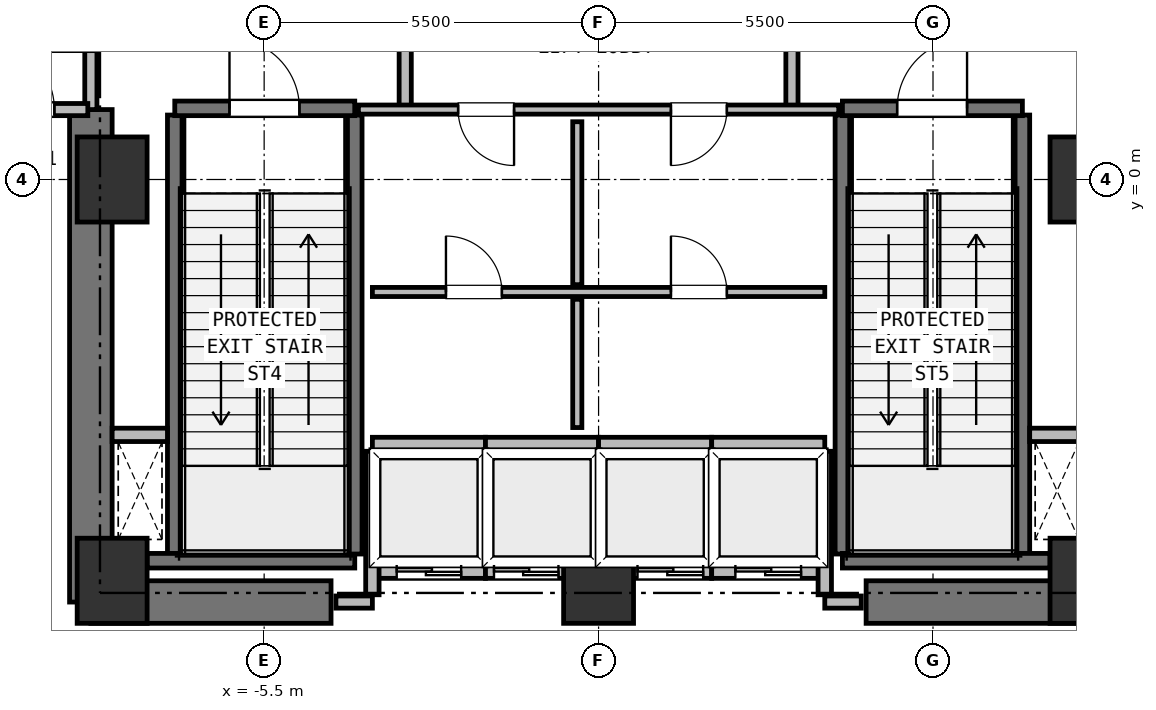
"""IFC4 building model, lengths in metres.
Left out: names, types, materials, properties, quantities, classifications, styles, units other than length and angle.
Written with IfcOpenShell. Run it as: python <this file> out.ifc"""

import sys

from ifc_helpers import new_model, si_unit, direction, frame, frame_2d, origin, origin_2d, place, context, subcontext, project, spatial, rectangle, extrude, element, fill, save


model = new_model("IFC4")
c1 = context("Model", 3, precision=1e-05, world=origin(), true_north=direction((0.0, 1.0)))
c2 = subcontext(c1, "Body", "Model", "MODEL_VIEW")
j1 = project(units=[si_unit("LENGTHUNIT", "METRE"), si_unit("PLANEANGLEUNIT", "RADIAN")], contexts=[c1])
p1 = place(None, origin())
s1 = spatial("IfcSite", under=j1, at=p1, CompositionType="ELEMENT")
p2 = place(p1, origin())
s2 = spatial("IfcBuilding", under=s1, at=p2, CompositionType="ELEMENT")
p3 = place(p2, origin())
s3 = spatial("IfcBuildingStorey", under=s2, at=p3, CompositionType="ELEMENT", Elevation=0.0)
for number, where, z_axis, x_axis in (
    (1, (-8.0, -6.6, 0.0), (0.0, 0.0, 1.0), (1.0, 0.0, 0.0)),
    (2, (0.0, -6.6, 0.0), (0.0, 0.0, 1.0), (1.0, 0.0, 0.0)),
    (3, (8.0, -6.6, 0.0), (0.0, 0.0, 1.0), (1.0, 0.0, 0.0)),
    (4, (8.0, 0.0, 0.0), (0.0, 0.0, 1.0), (1.0, 0.0, 0.0)),
    (5, (-8.0, 0.0, 0.0), (0.0, 0.0, 1.0), (1.0, 0.0, 0.0)),
):
    element("IfcColumn", number, at=place(p3, frame(where, z_axis=z_axis, x_axis=x_axis)), inside=s3, PredefinedType="COLUMN", context=c2, shape_type="SweptSolid", body=[
        extrude(rectangle(XDim=1.15, YDim=1.4, at=origin_2d()), origin(), (0.0, 0.0, 1.0), 6.0),
    ])
for number, where, z_axis, x_axis in (
    (6, (-8.35, -6.95, 0.0), (0.0, 0.0, 1.0), (1.0, 0.0, 0.0)),
    (7, (4.4, -6.95, 0.0), (0.0, 0.0, 1.0), (1.0, 0.0, 0.0)),
):
    element("IfcWall", number, at=place(p3, frame(where, z_axis=z_axis, x_axis=x_axis)), inside=s3, PredefinedType="SHEAR", context=c2, shape_type="SweptSolid", body=[
        extrude(rectangle(XDim=3.95, YDim=0.7, at=frame_2d((1.975, 0.0))), origin(), (0.0, 0.0, 1.0), 5.72),
    ])
p4 = place(p3, frame((-8.35, -6.95, 0.0), z_axis=(0.0, 0.0, 1.0), x_axis=(0.0, 1.0, 0.0)))
e8 = element("IfcWall", 8, at=p4, inside=s3, PredefinedType="SHEAR", context=c2, shape_type="SweptSolid", body=[
    extrude(rectangle(XDim=8.1, YDim=0.7, at=frame_2d((4.05, 0.0))), origin(), (0.0, 0.0, 1.0), 5.72),
])
p5 = place(p3, frame((-6.97, -6.16, 0.0), z_axis=(0.0, 0.0, 1.0), x_axis=(0.0, 1.0, 0.0)))
e9 = element("IfcWall", 9, at=p5, inside=s3, PredefinedType="SHEAR", context=c2, shape_type="SweptSolid", body=[
    extrude(rectangle(XDim=7.22, YDim=0.24, at=frame_2d((3.61, 0.0))), origin(), (0.0, 0.0, 1.0), 5.72),
])
p6 = place(p3, frame((-7.425, -6.27, 0.0), z_axis=(0.0, 0.0, 1.0), x_axis=(1.0, 0.0, 0.0)))
e10 = element("IfcWall", 10, at=p6, inside=s3, PredefinedType="SHEAR", context=c2, shape_type="SweptSolid", body=[
    extrude(rectangle(XDim=3.415, YDim=0.24, at=frame_2d((1.708, 0.0))), origin(), (0.0, 0.0, 1.0), 5.72),
])
p7 = place(p3, frame((-4.01, -6.16, 0.0), z_axis=(0.0, 0.0, 1.0), x_axis=(0.0, 1.0, 0.0)))
e11 = element("IfcWall", 11, at=p7, inside=s3, PredefinedType="SHEAR", context=c2, shape_type="SweptSolid", body=[
    extrude(rectangle(XDim=7.22, YDim=0.24, at=frame_2d((3.61, 0.0))), origin(), (0.0, 0.0, 1.0), 5.72),
])
p8 = place(p3, frame((-6.97, 1.17, 0.0), z_axis=(0.0, 0.0, 1.0), x_axis=(1.0, 0.0, 0.0)))
e12 = element("IfcWall", 12, at=p8, inside=s3, PredefinedType="SHEAR", context=c2, shape_type="SweptSolid", body=[
    extrude(rectangle(XDim=2.96, YDim=0.24, at=frame_2d((1.48, 0.0))), origin(), (0.0, 0.0, 1.0), 5.72),
])
p9 = place(p8, frame((0.9, 0.0, 0.0)))
e13 = element("IfcOpeningElement", 13, at=p9, cuts=e12, PredefinedType="OPENING", context=c2, shape_type="SweptSolid", body=[
    extrude(rectangle(XDim=1.15, YDim=2.15, at=frame_2d((0.575, 1.075))), frame((0.0, 0.13, 0.0), z_axis=(0.0, -1.0, 0.0), x_axis=(1.0, 0.0, 0.0)), (0.0, 0.0, 1.0), 0.26),
])
for number, where, z_axis, x_axis in (
    (14, (4.01, -6.16, 0.0), (0.0, 0.0, 1.0), (0.0, 1.0, 0.0)),
    (15, (6.97, -6.16, 0.0), (0.0, 0.0, 1.0), (0.0, 1.0, 0.0)),
):
    element("IfcWall", number, at=place(p3, frame(where, z_axis=z_axis, x_axis=x_axis)), inside=s3, PredefinedType="SHEAR", context=c2, shape_type="SweptSolid", body=[
        extrude(rectangle(XDim=7.22, YDim=0.24, at=frame_2d((3.61, 0.0))), origin(), (0.0, 0.0, 1.0), 5.72),
    ])
p10 = place(p3, frame((4.01, -6.27, 0.0), z_axis=(0.0, 0.0, 1.0), x_axis=(1.0, 0.0, 0.0)))
e16 = element("IfcWall", 16, at=p10, inside=s3, PredefinedType="SHEAR", context=c2, shape_type="SweptSolid", body=[
    extrude(rectangle(XDim=3.415, YDim=0.24, at=frame_2d((1.708, 0.0))), origin(), (0.0, 0.0, 1.0), 5.72),
])
p11 = place(p3, frame((4.01, 1.17, 0.0), z_axis=(0.0, 0.0, 1.0), x_axis=(1.0, 0.0, 0.0)))
e17 = element("IfcWall", 17, at=p11, inside=s3, PredefinedType="SHEAR", context=c2, shape_type="SweptSolid", body=[
    extrude(rectangle(XDim=2.96, YDim=0.24, at=frame_2d((1.48, 0.0))), origin(), (0.0, 0.0, 1.0), 5.72),
])
p12 = place(p11, frame((0.9, 0.0, 0.0)))
e18 = element("IfcOpeningElement", 18, at=p12, cuts=e17, PredefinedType="OPENING", context=c2, shape_type="SweptSolid", body=[
    extrude(rectangle(XDim=1.15, YDim=2.15, at=frame_2d((0.575, 1.075))), frame((0.0, 0.13, 0.0), z_axis=(0.0, -1.0, 0.0), x_axis=(1.0, 0.0, 0.0)), (0.0, 0.0, 1.0), 0.26),
])
for number, where, z_axis, x_axis in (
    (19, (-8.0, -4.2, 0.0), (0.0, 0.0, 1.0), (1.0, 0.0, 0.0)),
    (20, (7.09, -4.2, 0.0), (0.0, 0.0, 1.0), (1.0, 0.0, 0.0)),
):
    element("IfcWall", number, at=place(p3, frame(where, z_axis=z_axis, x_axis=x_axis)), inside=s3, PredefinedType="PARTITIONING", context=c2, shape_type="SweptSolid", body=[
        extrude(rectangle(XDim=0.91, YDim=0.22, at=frame_2d((0.455, 0.0))), origin(), (0.0, 0.0, 1.0), 5.72),
    ])
p13 = place(p3, frame((-3.72, -6.45, 0.0), z_axis=(0.0, 0.0, 1.0), x_axis=(1.0, 0.0, 0.0)))
e21 = element("IfcWall", 21, at=p13, inside=s3, PredefinedType="PARTITIONING", context=c2, shape_type="SweptSolid", body=[
    extrude(rectangle(XDim=1.86, YDim=0.22, at=frame_2d((0.93, 0.0))), origin(), (0.0, 0.0, 1.0), 5.3),
])
p14 = place(p13, frame((0.4, 0.0, 0.0)))
e22 = element("IfcOpeningElement", 22, at=p14, cuts=e21, PredefinedType="OPENING", context=c2, shape_type="SweptSolid", body=[
    extrude(rectangle(XDim=1.06, YDim=2.15, at=frame_2d((0.53, 1.075))), frame((0.0, 0.12, 0.0), z_axis=(0.0, -1.0, 0.0), x_axis=(1.0, 0.0, 0.0)), (0.0, 0.0, 1.0), 0.24),
])
p15 = place(p3, frame((-3.72, -4.35, 0.0), z_axis=(0.0, 0.0, 1.0), x_axis=(1.0, 0.0, 0.0)))
e23 = element("IfcWall", 23, at=p15, inside=s3, PredefinedType="PARTITIONING", context=c2, shape_type="SweptSolid", body=[
    extrude(rectangle(XDim=1.86, YDim=0.22, at=frame_2d((0.93, 0.0))), origin(), (0.0, 0.0, 1.0), 5.72),
])
p16 = place(p3, frame((-3.72, -6.83, 0.0), z_axis=(0.0, 0.0, 1.0), x_axis=(0.0, 1.0, 0.0)))
e24 = element("IfcWall", 24, at=p16, inside=s3, PredefinedType="PARTITIONING", context=c2, shape_type="SweptSolid", body=[
    extrude(rectangle(XDim=2.36, YDim=0.22, at=frame_2d((1.18, 0.0))), origin(), (0.0, 0.0, 1.0), 5.72),
])
p17 = place(p3, frame((-1.86, -6.33, 0.0), z_axis=(0.0, 0.0, 1.0), x_axis=(0.0, 1.0, 0.0)))
e25 = element("IfcWall", 25, at=p17, inside=s3, PredefinedType="PARTITIONING", context=c2, shape_type="SweptSolid", body=[
    extrude(rectangle(XDim=1.86, YDim=0.22, at=frame_2d((0.93, 0.0))), origin(), (0.0, 0.0, 1.0), 5.72),
])
p18 = place(p3, frame((-1.86, -6.45, 0.0), z_axis=(0.0, 0.0, 1.0), x_axis=(1.0, 0.0, 0.0)))
e26 = element("IfcWall", 26, at=p18, inside=s3, PredefinedType="PARTITIONING", context=c2, shape_type="SweptSolid", body=[
    extrude(rectangle(XDim=1.86, YDim=0.22, at=frame_2d((0.93, 0.0))), origin(), (0.0, 0.0, 1.0), 5.3),
])
p19 = place(p18, frame((0.14, 0.0, 0.0)))
e27 = element("IfcOpeningElement", 27, at=p19, cuts=e26, PredefinedType="OPENING", context=c2, shape_type="SweptSolid", body=[
    extrude(rectangle(XDim=1.06, YDim=2.15, at=frame_2d((0.53, 1.075))), frame((0.0, 0.12, 0.0), z_axis=(0.0, -1.0, 0.0), x_axis=(1.0, 0.0, 0.0)), (0.0, 0.0, 1.0), 0.24),
])
for number, where, z_axis, x_axis in (
    (28, (-1.86, -4.35, 0.0), (0.0, 0.0, 1.0), (1.0, 0.0, 0.0)),
    (29, (0.0, -6.33, 0.0), (0.0, 0.0, 1.0), (0.0, 1.0, 0.0)),
):
    element("IfcWall", number, at=place(p3, frame(where, z_axis=z_axis, x_axis=x_axis)), inside=s3, PredefinedType="PARTITIONING", context=c2, shape_type="SweptSolid", body=[
        extrude(rectangle(XDim=1.86, YDim=0.22, at=frame_2d((0.93, 0.0))), origin(), (0.0, 0.0, 1.0), 5.72),
    ])
p20 = place(p3, frame((0.0, -6.45, 0.0), z_axis=(0.0, 0.0, 1.0), x_axis=(1.0, 0.0, 0.0)))
e30 = element("IfcWall", 30, at=p20, inside=s3, PredefinedType="PARTITIONING", context=c2, shape_type="SweptSolid", body=[
    extrude(rectangle(XDim=1.86, YDim=0.22, at=frame_2d((0.93, 0.0))), origin(), (0.0, 0.0, 1.0), 5.3),
])
p21 = place(p20, frame((0.64, 0.0, 0.0)))
e31 = element("IfcOpeningElement", 31, at=p21, cuts=e30, PredefinedType="OPENING", context=c2, shape_type="SweptSolid", body=[
    extrude(rectangle(XDim=1.08, YDim=2.15, at=frame_2d((0.54, 1.075))), frame((0.0, 0.12, 0.0), z_axis=(0.0, -1.0, 0.0), x_axis=(1.0, 0.0, 0.0)), (0.0, 0.0, 1.0), 0.24),
])
for number, where, z_axis, x_axis in (
    (32, (0.0, -4.35, 0.0), (0.0, 0.0, 1.0), (1.0, 0.0, 0.0)),
    (33, (1.86, -6.33, 0.0), (0.0, 0.0, 1.0), (0.0, 1.0, 0.0)),
):
    element("IfcWall", number, at=place(p3, frame(where, z_axis=z_axis, x_axis=x_axis)), inside=s3, PredefinedType="PARTITIONING", context=c2, shape_type="SweptSolid", body=[
        extrude(rectangle(XDim=1.86, YDim=0.22, at=frame_2d((0.93, 0.0))), origin(), (0.0, 0.0, 1.0), 5.72),
    ])
p22 = place(p3, frame((1.86, -6.45, 0.0), z_axis=(0.0, 0.0, 1.0), x_axis=(1.0, 0.0, 0.0)))
e34 = element("IfcWall", 34, at=p22, inside=s3, PredefinedType="PARTITIONING", context=c2, shape_type="SweptSolid", body=[
    extrude(rectangle(XDim=1.86, YDim=0.22, at=frame_2d((0.93, 0.0))), origin(), (0.0, 0.0, 1.0), 5.3),
])
p23 = place(p22, frame((0.39, 0.0, 0.0)))
e35 = element("IfcOpeningElement", 35, at=p23, cuts=e34, PredefinedType="OPENING", context=c2, shape_type="SweptSolid", body=[
    extrude(rectangle(XDim=1.08, YDim=2.15, at=frame_2d((0.54, 1.075))), frame((0.0, 0.12, 0.0), z_axis=(0.0, -1.0, 0.0), x_axis=(1.0, 0.0, 0.0)), (0.0, 0.0, 1.0), 0.24),
])
p24 = place(p3, frame((1.86, -4.35, 0.0), z_axis=(0.0, 0.0, 1.0), x_axis=(1.0, 0.0, 0.0)))
e36 = element("IfcWall", 36, at=p24, inside=s3, PredefinedType="PARTITIONING", context=c2, shape_type="SweptSolid", body=[
    extrude(rectangle(XDim=1.86, YDim=0.22, at=frame_2d((0.93, 0.0))), origin(), (0.0, 0.0, 1.0), 5.72),
])
p25 = place(p3, frame((3.72, -6.83, 0.0), z_axis=(0.0, 0.0, 1.0), x_axis=(0.0, 1.0, 0.0)))
e37 = element("IfcWall", 37, at=p25, inside=s3, PredefinedType="PARTITIONING", context=c2, shape_type="SweptSolid", body=[
    extrude(rectangle(XDim=2.36, YDim=0.22, at=frame_2d((1.18, 0.0))), origin(), (0.0, 0.0, 1.0), 5.72),
])
p26 = place(p3, frame((-3.18, 1.15, 0.0), z_axis=(0.0, 0.0, 1.0), x_axis=(0.0, 1.0, 0.0)))
e38 = element("IfcWall", 38, at=p26, inside=s3, PredefinedType="PARTITIONING", context=c2, shape_type="SweptSolid", body=[
    extrude(rectangle(XDim=3.3, YDim=0.2, at=frame_2d((1.65, 0.0))), origin(), (0.0, 0.0, 1.0), 5.72),
])
p27 = place(p26, frame((1.08, 0.0, 0.0)))
e39 = element("IfcOpeningElement", 39, at=p27, cuts=e38, PredefinedType="OPENING", context=c2, shape_type="SweptSolid", body=[
    extrude(rectangle(XDim=1.15, YDim=2.15, at=frame_2d((0.575, 1.075))), frame((0.0, 0.11, 0.0), z_axis=(0.0, -1.0, 0.0), x_axis=(1.0, 0.0, 0.0)), (0.0, 0.0, 1.0), 0.22),
])
p28 = place(p3, frame((3.18, 1.15, 0.0), z_axis=(0.0, 0.0, 1.0), x_axis=(0.0, 1.0, 0.0)))
e40 = element("IfcWall", 40, at=p28, inside=s3, PredefinedType="PARTITIONING", context=c2, shape_type="SweptSolid", body=[
    extrude(rectangle(XDim=3.3, YDim=0.2, at=frame_2d((1.65, 0.0))), origin(), (0.0, 0.0, 1.0), 5.72),
])
p29 = place(p28, frame((1.08, 0.0, 0.0)))
e41 = element("IfcOpeningElement", 41, at=p29, cuts=e40, PredefinedType="OPENING", context=c2, shape_type="SweptSolid", body=[
    extrude(rectangle(XDim=1.15, YDim=2.15, at=frame_2d((0.575, 1.075))), frame((0.0, 0.11, 0.0), z_axis=(0.0, -1.0, 0.0), x_axis=(1.0, 0.0, 0.0)), (0.0, 0.0, 1.0), 0.22),
])
p30 = place(p3, frame((-8.35, 1.15, 0.0), z_axis=(0.0, 0.0, 1.0), x_axis=(0.0, 1.0, 0.0)))
e42 = element("IfcWall", 42, at=p30, inside=s3, PredefinedType="PARTITIONING", context=c2, shape_type="SweptSolid", body=[
    extrude(rectangle(XDim=5.4, YDim=0.2, at=frame_2d((2.7, 0.0))), origin(), (0.0, 0.0, 1.0), 5.72),
])
p31 = place(p30, frame((0.95, 0.0, 0.0)))
e43 = element("IfcOpeningElement", 43, at=p31, cuts=e42, PredefinedType="OPENING", context=c2, shape_type="SweptSolid", body=[
    extrude(rectangle(XDim=1.15, YDim=2.15, at=frame_2d((0.575, 1.075))), frame((0.0, 0.11, 0.0), z_axis=(0.0, -1.0, 0.0), x_axis=(1.0, 0.0, 0.0)), (0.0, 0.0, 1.0), 0.22),
])
p32 = place(p3, frame((3.95, 1.15, 0.0), z_axis=(0.0, 0.0, 1.0), x_axis=(-1.0, 0.0, 0.0)))
e44 = element("IfcWall", 44, at=p32, inside=s3, PredefinedType="PARTITIONING", context=c2, shape_type="SweptSolid", body=[
    extrude(rectangle(XDim=7.9, YDim=0.15, at=frame_2d((3.95, 0.0))), origin(), (0.0, 0.0, 1.0), 5.72),
])
p33 = place(p32, frame((5.34, 0.0, 0.0)))
e45 = element("IfcOpeningElement", 45, at=p33, cuts=e44, PredefinedType="OPENING", context=c2, shape_type="SweptSolid", body=[
    extrude(rectangle(XDim=0.92, YDim=2.05, at=frame_2d((0.46, 1.025))), frame((0.0, 0.085, 0.0), z_axis=(0.0, -1.0, 0.0), x_axis=(1.0, 0.0, 0.0)), (0.0, 0.0, 1.0), 0.17),
])
p34 = place(p32, frame((1.84, 0.0, 0.0)))
e46 = element("IfcOpeningElement", 46, at=p34, cuts=e44, PredefinedType="OPENING", context=c2, shape_type="SweptSolid", body=[
    extrude(rectangle(XDim=0.92, YDim=2.05, at=frame_2d((0.46, 1.025))), frame((0.0, 0.085, 0.0), z_axis=(0.0, -1.0, 0.0), x_axis=(1.0, 0.0, 0.0)), (0.0, 0.0, 1.0), 0.17),
])
for number, where, z_axis, x_axis in (
    (47, (-4.32, -6.95, 0.0), (0.0, 0.0, 1.0), (1.0, 0.0, 0.0)),
    (48, (3.72, -6.95, 0.0), (0.0, 0.0, 1.0), (1.0, 0.0, 0.0)),
):
    element("IfcWall", number, at=place(p3, frame(where, z_axis=z_axis, x_axis=x_axis)), inside=s3, PredefinedType="PARTITIONING", context=c2, shape_type="SweptSolid", body=[
        extrude(rectangle(XDim=0.6, YDim=0.2, at=frame_2d((0.3, 0.0))), origin(), (0.0, 0.0, 1.0), 5.72),
    ])
p35 = place(p3, frame((-3.72, -1.85, 0.0), z_axis=(0.0, 0.0, 1.0), x_axis=(1.0, 0.0, 0.0)))
e49 = element("IfcWall", 49, at=p35, inside=s3, PredefinedType="PARTITIONING", context=c2, shape_type="SweptSolid", body=[
    extrude(rectangle(XDim=7.44, YDim=0.15, at=frame_2d((3.72, 0.0))), origin(), (0.0, 0.0, 1.0), 5.72),
])
p36 = place(p35, frame((1.21, 0.0, 0.0)))
e50 = element("IfcOpeningElement", 50, at=p36, cuts=e49, PredefinedType="OPENING", context=c2, shape_type="SweptSolid", body=[
    extrude(rectangle(XDim=0.92, YDim=2.05, at=frame_2d((0.46, 1.025))), frame((0.0, 0.085, 0.0), z_axis=(0.0, -1.0, 0.0), x_axis=(1.0, 0.0, 0.0)), (0.0, 0.0, 1.0), 0.17),
])
p37 = place(p35, frame((4.91, 0.0, 0.0)))
e51 = element("IfcOpeningElement", 51, at=p37, cuts=e49, PredefinedType="OPENING", context=c2, shape_type="SweptSolid", body=[
    extrude(rectangle(XDim=0.92, YDim=2.05, at=frame_2d((0.46, 1.025))), frame((0.0, 0.085, 0.0), z_axis=(0.0, -1.0, 0.0), x_axis=(1.0, 0.0, 0.0)), (0.0, 0.0, 1.0), 0.17),
])
p38 = place(p3, frame((-0.35, -4.08, 0.0), z_axis=(0.0, 0.0, 1.0), x_axis=(0.0, 1.0, 0.0)))
e52 = element("IfcWall", 52, at=p38, inside=s3, PredefinedType="PARTITIONING", context=c2, shape_type="SweptSolid", body=[
    extrude(rectangle(XDim=2.11, YDim=0.15, at=frame_2d((1.055, 0.0))), origin(), (0.0, 0.0, 1.0), 5.72),
])
p39 = place(p3, frame((-0.35, -1.73, 0.0), z_axis=(0.0, 0.0, 1.0), x_axis=(0.0, 1.0, 0.0)))
e53 = element("IfcWall", 53, at=p39, inside=s3, PredefinedType="PARTITIONING", context=c2, shape_type="SweptSolid", body=[
    extrude(rectangle(XDim=2.68, YDim=0.15, at=frame_2d((1.34, 0.0))), origin(), (0.0, 0.0, 1.0), 5.72),
])
p40 = place(p3, frame((-10.65, 1.15, 0.0), z_axis=(0.0, 0.0, 1.0), x_axis=(1.0, 0.0, 0.0)))
e54 = element("IfcWall", 54, at=p40, inside=s3, PredefinedType="PARTITIONING", context=c2, shape_type="SweptSolid", body=[
    extrude(rectangle(XDim=2.25, YDim=0.2, at=frame_2d((1.125, 0.0))), origin(), (0.0, 0.0, 1.0), 5.72),
])
p41 = place(p40, frame((0.55, 0.0, 0.0)))
e55 = element("IfcOpeningElement", 55, at=p41, cuts=e54, PredefinedType="OPENING", context=c2, shape_type="SweptSolid", body=[
    extrude(rectangle(XDim=1.15, YDim=2.15, at=frame_2d((0.575, 1.075))), frame((0.0, 0.11, 0.0), z_axis=(0.0, -1.0, 0.0), x_axis=(1.0, 0.0, 0.0)), (0.0, 0.0, 1.0), 0.22),
])
p42 = place(p9, origin())
e56 = element("IfcDoor", 56, at=p42, inside=s3, OperationType="SINGLE_SWING_LEFT", PredefinedType="DOOR", context=c2, shape_type="SweptSolid", body=[
    extrude(rectangle(XDim=1.15, YDim=2.15, at=frame_2d((0.575, 1.075))), frame((0.0, 0.025, 0.0), z_axis=(0.0, -1.0, 0.0), x_axis=(1.0, 0.0, 0.0)), (0.0, 0.0, 1.0), 0.05),
])
fill(e13, e56)
p43 = place(p12, origin())
e57 = element("IfcDoor", 57, at=p43, inside=s3, OperationType="SINGLE_SWING_RIGHT", PredefinedType="DOOR", context=c2, shape_type="SweptSolid", body=[
    extrude(rectangle(XDim=1.15, YDim=2.15, at=frame_2d((0.575, 1.075))), frame((0.0, 0.025, 0.0), z_axis=(0.0, -1.0, 0.0), x_axis=(1.0, 0.0, 0.0)), (0.0, 0.0, 1.0), 0.05),
])
fill(e18, e57)
p44 = place(p14, origin())
e58 = element("IfcDoor", 58, at=p44, inside=s3, OperationType="DOUBLE_DOOR_SLIDING", PredefinedType="DOOR", context=c2, shape_type="SweptSolid", body=[
    extrude(rectangle(XDim=1.06, YDim=2.15, at=frame_2d((0.53, 1.075))), frame((0.0, 0.025, 0.0), z_axis=(0.0, -1.0, 0.0), x_axis=(1.0, 0.0, 0.0)), (0.0, 0.0, 1.0), 0.05),
])
fill(e22, e58)
p45 = place(p19, origin())
e59 = element("IfcDoor", 59, at=p45, inside=s3, OperationType="DOUBLE_DOOR_SLIDING", PredefinedType="DOOR", context=c2, shape_type="SweptSolid", body=[
    extrude(rectangle(XDim=1.06, YDim=2.15, at=frame_2d((0.53, 1.075))), frame((0.0, 0.025, 0.0), z_axis=(0.0, -1.0, 0.0), x_axis=(1.0, 0.0, 0.0)), (0.0, 0.0, 1.0), 0.05),
])
fill(e27, e59)
p46 = place(p21, origin())
e60 = element("IfcDoor", 60, at=p46, inside=s3, OperationType="DOUBLE_DOOR_SLIDING", PredefinedType="DOOR", context=c2, shape_type="SweptSolid", body=[
    extrude(rectangle(XDim=1.08, YDim=2.15, at=frame_2d((0.54, 1.075))), frame((0.0, 0.025, 0.0), z_axis=(0.0, -1.0, 0.0), x_axis=(1.0, 0.0, 0.0)), (0.0, 0.0, 1.0), 0.05),
])
fill(e31, e60)
p47 = place(p23, origin())
e61 = element("IfcDoor", 61, at=p47, inside=s3, OperationType="DOUBLE_DOOR_SLIDING", PredefinedType="DOOR", context=c2, shape_type="SweptSolid", body=[
    extrude(rectangle(XDim=1.08, YDim=2.15, at=frame_2d((0.54, 1.075))), frame((0.0, 0.025, 0.0), z_axis=(0.0, -1.0, 0.0), x_axis=(1.0, 0.0, 0.0)), (0.0, 0.0, 1.0), 0.05),
])
fill(e35, e61)
p48 = place(p31, origin())
e62 = element("IfcDoor", 62, at=p48, inside=s3, OperationType="SINGLE_SWING_LEFT", PredefinedType="DOOR", context=c2, shape_type="SweptSolid", body=[
    extrude(rectangle(XDim=1.15, YDim=2.15, at=frame_2d((0.575, 1.075))), frame((0.0, 0.025, 0.0), z_axis=(0.0, -1.0, 0.0), x_axis=(1.0, 0.0, 0.0)), (0.0, 0.0, 1.0), 0.05),
])
fill(e43, e62)
p49 = place(p33, origin())
e63 = element("IfcDoor", 63, at=p49, inside=s3, OperationType="SINGLE_SWING_LEFT", PredefinedType="DOOR", context=c2, shape_type="SweptSolid", body=[
    extrude(rectangle(XDim=0.92, YDim=2.05, at=frame_2d((0.46, 1.025))), frame((0.0, 0.025, 0.0), z_axis=(0.0, -1.0, 0.0), x_axis=(1.0, 0.0, 0.0)), (0.0, 0.0, 1.0), 0.05),
])
fill(e45, e63)
p50 = place(p34, origin())
e64 = element("IfcDoor", 64, at=p50, inside=s3, OperationType="SINGLE_SWING_RIGHT", PredefinedType="DOOR", context=c2, shape_type="SweptSolid", body=[
    extrude(rectangle(XDim=0.92, YDim=2.05, at=frame_2d((0.46, 1.025))), frame((0.0, 0.025, 0.0), z_axis=(0.0, -1.0, 0.0), x_axis=(1.0, 0.0, 0.0)), (0.0, 0.0, 1.0), 0.05),
])
fill(e46, e64)
p51 = place(p36, origin())
e65 = element("IfcDoor", 65, at=p51, inside=s3, OperationType="SINGLE_SWING_LEFT", PredefinedType="DOOR", context=c2, shape_type="SweptSolid", body=[
    extrude(rectangle(XDim=0.92, YDim=2.05, at=frame_2d((0.46, 1.025))), frame((0.0, 0.025, 0.0), z_axis=(0.0, -1.0, 0.0), x_axis=(1.0, 0.0, 0.0)), (0.0, 0.0, 1.0), 0.05),
])
fill(e50, e65)
p52 = place(p37, origin())
e66 = element("IfcDoor", 66, at=p52, inside=s3, OperationType="SINGLE_SWING_LEFT", PredefinedType="DOOR", context=c2, shape_type="SweptSolid", body=[
    extrude(rectangle(XDim=0.92, YDim=2.05, at=frame_2d((0.46, 1.025))), frame((0.0, 0.025, 0.0), z_axis=(0.0, -1.0, 0.0), x_axis=(1.0, 0.0, 0.0)), (0.0, 0.0, 1.0), 0.05),
])
fill(e51, e66)
p53 = place(p41, origin())
e67 = element("IfcDoor", 67, at=p53, inside=s3, OperationType="SINGLE_SWING_LEFT", PredefinedType="DOOR", context=c2, shape_type="SweptSolid", body=[
    extrude(rectangle(XDim=1.15, YDim=2.15, at=frame_2d((0.575, 1.075))), frame((0.0, 0.025, 0.0), z_axis=(0.0, -1.0, 0.0), x_axis=(1.0, 0.0, 0.0)), (0.0, 0.0, 1.0), 0.05),
])
fill(e55, e67)
save(model, sys.argv[1])
